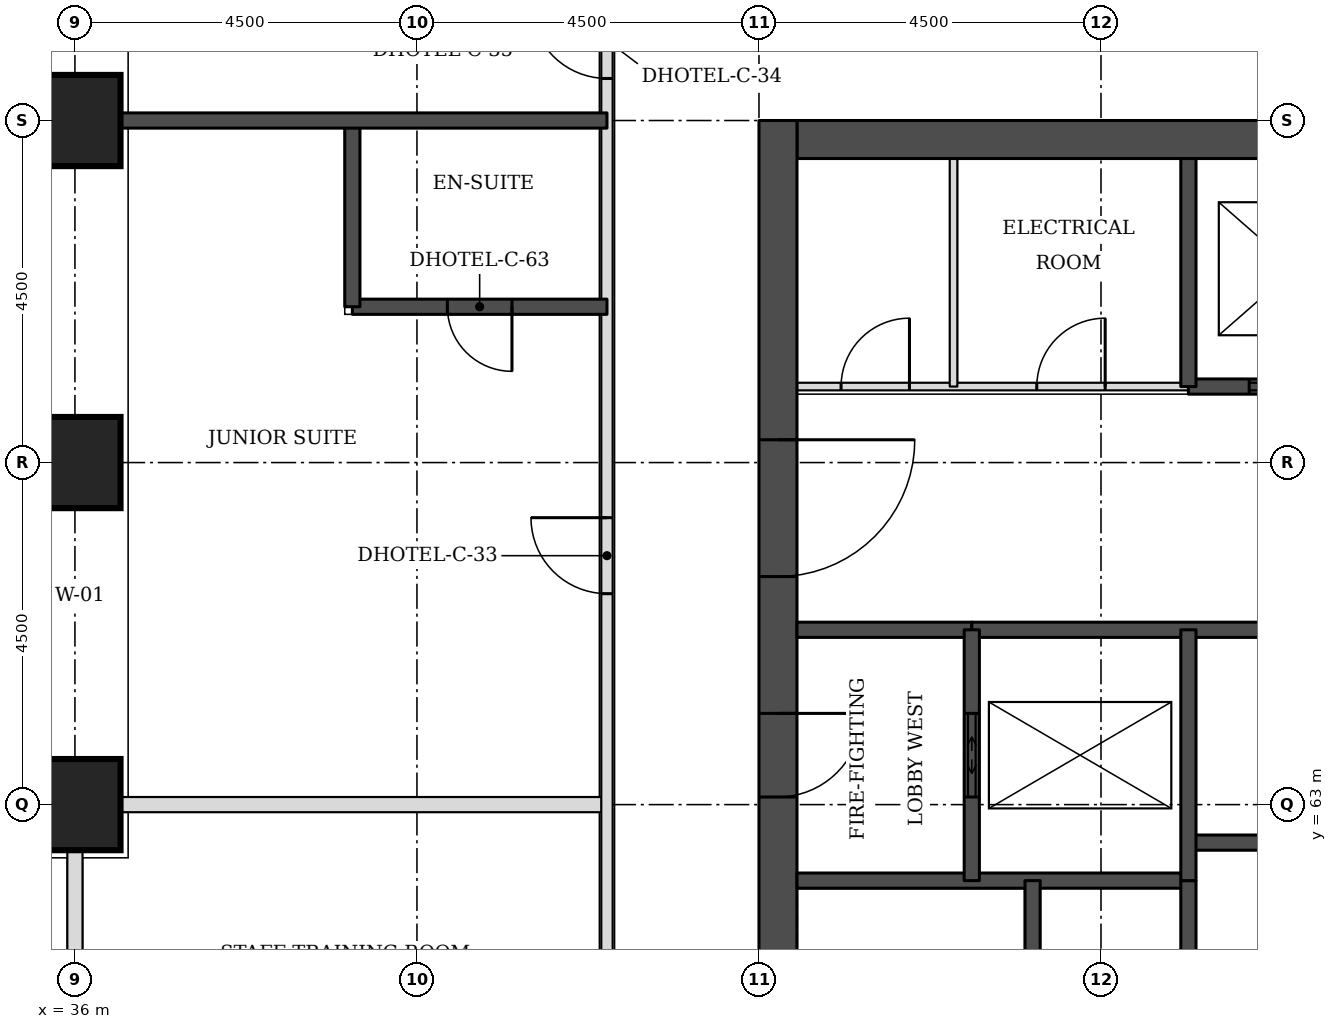
"""IFC4 building model, lengths in metres.
Left out: names, types, materials, properties, quantities, classifications, styles, units other than length and angle.
Written with IfcOpenShell. Run it as: python <this file> out.ifc"""

import sys

from ifc_helpers import new_model, si_unit, direction, frame, frame_2d, origin, origin_2d, place, context, subcontext, project, spatial, rectangle, extrude, element, fill, save


model = new_model("IFC4")
c1 = context("Model", 3, precision=1e-05, world=origin(), true_north=direction((0.0, 1.0)))
c2 = subcontext(c1, "Body", "Model", "MODEL_VIEW")
j1 = project(units=[si_unit("LENGTHUNIT", "METRE"), si_unit("PLANEANGLEUNIT", "RADIAN")], contexts=[c1])
p1 = place(None, origin())
s1 = spatial("IfcSite", under=j1, at=p1, CompositionType="ELEMENT")
p2 = place(p1, origin())
s2 = spatial("IfcBuilding", under=s1, at=p2, CompositionType="ELEMENT")
p3 = place(p2, frame((0.0, 0.0, 33.0)))
s3 = spatial("IfcBuildingStorey", under=s2, at=p3, CompositionType="ELEMENT", Elevation=33.0)
for number, where, z_axis, x_axis in (
    (1, (36.0, 63.0, 0.0), (0.0, 0.0, 1.0), (1.0, 0.0, 0.0)),
    (2, (36.0, 67.5, 0.0), (0.0, 0.0, 1.0), (1.0, 0.0, 0.0)),
    (3, (36.0, 72.0, 0.0), (0.0, 0.0, 1.0), (1.0, 0.0, 0.0)),
):
    element("IfcColumn", number, at=place(p3, frame(where, z_axis=z_axis, x_axis=x_axis)), inside=s3, PredefinedType="COLUMN", context=c2, shape_type="SweptSolid", body=[
        extrude(rectangle(XDim=1.2, YDim=1.2, at=origin_2d()), origin(), (0.0, 0.0, 1.0), 3.3),
    ])
p4 = place(p3, frame((45.5, 71.75, 0.0), z_axis=(0.0, 0.0, 1.0), x_axis=(1.0, 0.0, 0.0)))
e4 = element("IfcWall", 4, at=p4, inside=s3, PredefinedType="SHEAR", context=c2, shape_type="SweptSolid", body=[
    extrude(rectangle(XDim=21.5, YDim=0.5, at=frame_2d((10.75, 0.0))), origin(), (0.0, 0.0, 1.0), 3.3),
])
p5 = place(p3, frame((45.25, 49.5, 0.0), z_axis=(0.0, 0.0, 1.0), x_axis=(0.0, 1.0, 0.0)))
e5 = element("IfcWall", 5, at=p5, inside=s3, PredefinedType="SHEAR", context=c2, shape_type="SweptSolid", body=[
    extrude(rectangle(XDim=22.5, YDim=0.5, at=frame_2d((11.25, 0.0))), origin(), (0.0, 0.0, 1.0), 3.3),
])
p6 = place(p5, frame((4.2, 0.0, 0.0)))
e6 = element("IfcOpeningElement", 6, at=p6, cuts=e5, PredefinedType="OPENING", context=c2, shape_type="SweptSolid", body=[
    extrude(rectangle(XDim=1.8, YDim=2.1, at=frame_2d((0.9, 1.05))), frame((0.0, 0.26, 0.0), z_axis=(0.0, -1.0, 0.0), x_axis=(1.0, 0.0, 0.0)), (0.0, 0.0, 1.0), 0.52),
])
p7 = place(p5, frame((6.9, 0.0, 0.0)))
e7 = element("IfcOpeningElement", 7, at=p7, cuts=e5, PredefinedType="OPENING", context=c2, shape_type="SweptSolid", body=[
    extrude(rectangle(XDim=1.1, YDim=2.1, at=frame_2d((0.55, 1.05))), frame((0.0, 0.26, 0.0), z_axis=(0.0, -1.0, 0.0), x_axis=(1.0, 0.0, 0.0)), (0.0, 0.0, 1.0), 0.52),
])
p8 = place(p5, frame((13.6, 0.0, 0.0)))
e8 = element("IfcOpeningElement", 8, at=p8, cuts=e5, PredefinedType="OPENING", context=c2, shape_type="SweptSolid", body=[
    extrude(rectangle(XDim=1.1, YDim=2.1, at=frame_2d((0.55, 1.05))), frame((0.0, 0.26, 0.0), z_axis=(0.0, -1.0, 0.0), x_axis=(1.0, 0.0, 0.0)), (0.0, 0.0, 1.0), 0.52),
])
p9 = place(p5, frame((16.5, 0.0, 0.0)))
e9 = element("IfcOpeningElement", 9, at=p9, cuts=e5, PredefinedType="OPENING", context=c2, shape_type="SweptSolid", body=[
    extrude(rectangle(XDim=1.8, YDim=2.1, at=frame_2d((0.9, 1.05))), frame((0.0, 0.26, 0.0), z_axis=(0.0, -1.0, 0.0), x_axis=(1.0, 0.0, 0.0)), (0.0, 0.0, 1.0), 0.52),
])
p10 = place(p3, frame((36.0, 56.0, 0.0), z_axis=(0.0, 0.0, 1.0), x_axis=(0.0, 1.0, 0.0)))
e10 = element("IfcWall", 10, at=p10, inside=s3, PredefinedType="PARTITIONING", context=c2, shape_type="SweptSolid", body=[
    extrude(rectangle(XDim=6.4, YDim=0.2, at=frame_2d((3.2, 0.0))), origin(), (0.0, 0.0, 1.0), 2.33),
])
p11 = place(p3, frame((36.6, 63.0, 0.0), z_axis=(0.0, 0.0, 1.0), x_axis=(1.0, 0.0, 0.0)))
e11 = element("IfcWall", 11, at=p11, inside=s3, PredefinedType="PARTITIONING", context=c2, shape_type="SweptSolid", body=[
    extrude(rectangle(XDim=6.4, YDim=0.2, at=frame_2d((3.2, 0.0))), origin(), (0.0, 0.0, 1.0), 3.08),
])
p12 = place(p3, frame((43.0, 56.0, 0.0), z_axis=(0.0, 0.0, 1.0), x_axis=(0.0, 1.0, 0.0)))
e12 = element("IfcWall", 12, at=p12, inside=s3, PredefinedType="PARTITIONING", context=c2, shape_type="SweptSolid", body=[
    extrude(rectangle(XDim=18.0, YDim=0.15, at=frame_2d((9.0, 0.0))), origin(), (0.0, 0.0, 1.0), 3.08),
])
p13 = place(p12, frame((9.775, 0.0, 0.0)))
e13 = element("IfcOpeningElement", 13, at=p13, cuts=e12, PredefinedType="OPENING", context=c2, shape_type="SweptSolid", body=[
    extrude(rectangle(XDim=1.0, YDim=2.1, at=frame_2d((0.5, 1.05))), frame((0.0, 0.085, 0.0), z_axis=(0.0, -1.0, 0.0), x_axis=(1.0, 0.0, 0.0)), (0.0, 0.0, 1.0), 0.17),
])
p14 = place(p12, frame((16.553, 0.0, 0.0)))
e14 = element("IfcOpeningElement", 14, at=p14, cuts=e12, PredefinedType="OPENING", context=c2, shape_type="SweptSolid", body=[
    extrude(rectangle(XDim=1.0, YDim=2.1, at=frame_2d((0.5, 1.05))), frame((0.0, 0.085, 0.0), z_axis=(0.0, -1.0, 0.0), x_axis=(1.0, 0.0, 0.0)), (0.0, 0.0, 1.0), 0.17),
])
p15 = place(p12, frame((3.05, 0.0, 0.0)))
e15 = element("IfcOpeningElement", 15, at=p15, cuts=e12, PredefinedType="OPENING", context=c2, shape_type="SweptSolid", body=[
    extrude(rectangle(XDim=0.9, YDim=2.1, at=frame_2d((0.45, 1.05))), frame((0.0, 0.085, 0.0), z_axis=(0.0, -1.0, 0.0), x_axis=(1.0, 0.0, 0.0)), (0.0, 0.0, 1.0), 0.17),
])
p16 = place(p3, frame((39.65, 69.55, 0.0), z_axis=(0.0, 0.0, 1.0), x_axis=(1.0, 0.0, 0.0)))
e16 = element("IfcWall", 16, at=p16, inside=s3, PredefinedType="SOLIDWALL", context=c2, shape_type="SweptSolid", body=[
    extrude(rectangle(XDim=3.35, YDim=0.2, at=frame_2d((1.675, 0.0))), origin(), (0.0, 0.0, 1.0), 3.08),
])
p17 = place(p16, frame((1.25, 0.0, 0.0)))
e17 = element("IfcOpeningElement", 17, at=p17, cuts=e16, PredefinedType="OPENING", context=c2, shape_type="SweptSolid", body=[
    extrude(rectangle(XDim=0.85, YDim=2.1, at=frame_2d((0.425, 1.05))), frame((0.0, 0.11, 0.0), z_axis=(0.0, -1.0, 0.0), x_axis=(1.0, 0.0, 0.0)), (0.0, 0.0, 1.0), 0.22),
])
p18 = place(p3, frame((39.65, 69.55, 0.0), z_axis=(0.0, 0.0, 1.0), x_axis=(0.0, 1.0, 0.0)))
e18 = element("IfcWall", 18, at=p18, inside=s3, PredefinedType="SOLIDWALL", context=c2, shape_type="SweptSolid", body=[
    extrude(rectangle(XDim=2.45, YDim=0.2, at=frame_2d((1.225, 0.0))), origin(), (0.0, 0.0, 1.0), 3.08),
])
p19 = place(p3, frame((36.6, 72.0, 0.0), z_axis=(0.0, 0.0, 1.0), x_axis=(1.0, 0.0, 0.0)))
e19 = element("IfcWall", 19, at=p19, inside=s3, PredefinedType="SOLIDWALL", context=c2, shape_type="SweptSolid", body=[
    extrude(rectangle(XDim=6.4, YDim=0.2, at=frame_2d((3.2, 0.0))), origin(), (0.0, 0.0, 1.0), 3.08),
])
p20 = place(p3, frame((45.5, 62.0, 0.0), z_axis=(0.0, 0.0, 1.0), x_axis=(1.0, 0.0, 0.0)))
e20 = element("IfcWall", 20, at=p20, inside=s3, PredefinedType="SOLIDWALL", context=c2, shape_type="SweptSolid", body=[
    extrude(rectangle(XDim=5.15, YDim=0.2, at=frame_2d((2.575, 0.0))), origin(), (0.0, 0.0, 1.0), 3.08),
])
p21 = place(p3, frame((50.65, 62.5, 0.0), z_axis=(0.0, 0.0, 1.0), x_axis=(1.0, 0.0, 0.0)))
e21 = element("IfcWall", 21, at=p21, inside=s3, PredefinedType="SOLIDWALL", context=c2, shape_type="SweptSolid", body=[
    extrude(rectangle(XDim=11.2, YDim=0.2, at=frame_2d((5.6, 0.0))), origin(), (0.0, 0.0, 1.0), 3.3),
])
p22 = place(p3, frame((45.5, 65.3, 0.0), z_axis=(0.0, 0.0, 1.0), x_axis=(1.0, 0.0, 0.0)))
e22 = element("IfcWall", 22, at=p22, inside=s3, PredefinedType="SOLIDWALL", context=c2, shape_type="SweptSolid", body=[
    extrude(rectangle(XDim=2.3, YDim=0.2, at=frame_2d((1.15, 0.0))), origin(), (0.0, 0.0, 1.0), 3.08),
])
p23 = place(p3, frame((47.8, 65.3, 0.0), z_axis=(0.0, 0.0, 1.0), x_axis=(1.0, 0.0, 0.0)))
e23 = element("IfcWall", 23, at=p23, inside=s3, PredefinedType="SOLIDWALL", context=c2, shape_type="SweptSolid", body=[
    extrude(rectangle(XDim=16.9, YDim=0.2, at=frame_2d((8.45, 0.0))), origin(), (0.0, 0.0, 1.0), 3.08),
])
p24 = place(p3, frame((45.5, 68.5, 0.0), z_axis=(0.0, 0.0, 1.0), x_axis=(1.0, 0.0, 0.0)))
e24 = element("IfcWall", 24, at=p24, inside=s3, PredefinedType="PARTITIONING", context=c2, shape_type="SweptSolid", body=[
    extrude(rectangle(XDim=5.15, YDim=0.1, at=frame_2d((2.575, 0.0))), origin(), (0.0, 0.0, 1.0), 3.08),
])
p25 = place(p24, frame((0.58, 0.0, 0.0)))
e25 = element("IfcOpeningElement", 25, at=p25, cuts=e24, PredefinedType="OPENING", context=c2, shape_type="SweptSolid", body=[
    extrude(rectangle(XDim=0.9, YDim=2.1, at=frame_2d((0.45, 1.05))), frame((0.0, 0.06, 0.0), z_axis=(0.0, -1.0, 0.0), x_axis=(1.0, 0.0, 0.0)), (0.0, 0.0, 1.0), 0.12),
])
p26 = place(p24, frame((3.155, 0.0, 0.0)))
e26 = element("IfcOpeningElement", 26, at=p26, cuts=e24, PredefinedType="OPENING", context=c2, shape_type="SweptSolid", body=[
    extrude(rectangle(XDim=0.9, YDim=2.1, at=frame_2d((0.45, 1.05))), frame((0.0, 0.06, 0.0), z_axis=(0.0, -1.0, 0.0), x_axis=(1.0, 0.0, 0.0)), (0.0, 0.0, 1.0), 0.12),
])
p27 = place(p3, frame((50.65, 68.5, 0.0), z_axis=(0.0, 0.0, 1.0), x_axis=(1.0, 0.0, 0.0)))
e27 = element("IfcWall", 27, at=p27, inside=s3, PredefinedType="SOLIDWALL", context=c2, shape_type="SweptSolid", body=[
    extrude(rectangle(XDim=11.2, YDim=0.2, at=frame_2d((5.6, 0.0))), origin(), (0.0, 0.0, 1.0), 3.08),
])
p28 = place(p27, frame((0.8, 0.0, 0.0)))
e28 = element("IfcOpeningElement", 28, at=p28, cuts=e27, PredefinedType="OPENING", context=c2, shape_type="SweptSolid", body=[
    extrude(rectangle(XDim=1.2, YDim=2.1, at=frame_2d((0.6, 1.05))), frame((0.0, 0.11, 0.0), z_axis=(0.0, -1.0, 0.0), x_axis=(1.0, 0.0, 0.0)), (0.0, 0.0, 1.0), 0.22),
])
p29 = place(p27, frame((3.6, 0.0, 0.0)))
e29 = element("IfcOpeningElement", 29, at=p29, cuts=e27, PredefinedType="OPENING", context=c2, shape_type="SweptSolid", body=[
    extrude(rectangle(XDim=1.2, YDim=2.1, at=frame_2d((0.6, 1.05))), frame((0.0, 0.11, 0.0), z_axis=(0.0, -1.0, 0.0), x_axis=(1.0, 0.0, 0.0)), (0.0, 0.0, 1.0), 0.22),
])
p30 = place(p27, frame((6.4, 0.0, 0.0)))
e30 = element("IfcOpeningElement", 30, at=p30, cuts=e27, PredefinedType="OPENING", context=c2, shape_type="SweptSolid", body=[
    extrude(rectangle(XDim=1.2, YDim=2.1, at=frame_2d((0.6, 1.05))), frame((0.0, 0.11, 0.0), z_axis=(0.0, -1.0, 0.0), x_axis=(1.0, 0.0, 0.0)), (0.0, 0.0, 1.0), 0.22),
])
p31 = place(p27, frame((9.2, 0.0, 0.0)))
e31 = element("IfcOpeningElement", 31, at=p31, cuts=e27, PredefinedType="OPENING", context=c2, shape_type="SweptSolid", body=[
    extrude(rectangle(XDim=1.2, YDim=2.1, at=frame_2d((0.6, 1.05))), frame((0.0, 0.11, 0.0), z_axis=(0.0, -1.0, 0.0), x_axis=(1.0, 0.0, 0.0)), (0.0, 0.0, 1.0), 0.22),
])
p32 = place(p3, frame((47.56, 68.5, 0.0), z_axis=(0.0, 0.0, 1.0), x_axis=(0.0, 1.0, 0.0)))
e32 = element("IfcWall", 32, at=p32, inside=s3, PredefinedType="PARTITIONING", context=c2, shape_type="SweptSolid", body=[
    extrude(rectangle(XDim=3.0, YDim=0.1, at=frame_2d((1.5, 0.0))), origin(), (0.0, 0.0, 1.0), 3.08),
])
p33 = place(p3, frame((47.8, 62.0, 0.0), z_axis=(0.0, 0.0, 1.0), x_axis=(0.0, 1.0, 0.0)))
e33 = element("IfcWall", 33, at=p33, inside=s3, PredefinedType="SOLIDWALL", context=c2, shape_type="SweptSolid", body=[
    extrude(rectangle(XDim=3.3, YDim=0.2, at=frame_2d((1.65, 0.0))), origin(), (0.0, 0.0, 1.0), 3.08),
])
p34 = place(p33, frame((1.1, 0.0, 0.0)))
e34 = element("IfcOpeningElement", 34, at=p34, cuts=e33, PredefinedType="OPENING", context=c2, shape_type="SweptSolid", body=[
    extrude(rectangle(XDim=1.1, YDim=2.1, at=frame_2d((0.55, 1.05))), frame((0.0, 0.11, 0.0), z_axis=(0.0, -1.0, 0.0), x_axis=(1.0, 0.0, 0.0)), (0.0, 0.0, 1.0), 0.22),
])
p35 = place(p3, frame((48.6, 56.2, 0.0), z_axis=(0.0, 0.0, 1.0), x_axis=(0.0, 1.0, 0.0)))
e35 = element("IfcWall", 35, at=p35, inside=s3, PredefinedType="SOLIDWALL", context=c2, shape_type="SweptSolid", body=[
    extrude(rectangle(XDim=5.8, YDim=0.2, at=frame_2d((2.9, 0.0))), origin(), (0.0, 0.0, 1.0), 3.08),
])
p36 = place(p3, frame((50.65, 59.0, 0.0), z_axis=(0.0, 0.0, 1.0), x_axis=(0.0, 1.0, 0.0)))
e36 = element("IfcWall", 36, at=p36, inside=s3, PredefinedType="SOLIDWALL", context=c2, shape_type="SweptSolid", body=[
    extrude(rectangle(XDim=3.0, YDim=0.2, at=frame_2d((1.5, 0.0))), origin(), (0.0, 0.0, 1.0), 3.3),
])
p37 = place(p3, frame((50.65, 62.0, 0.0), z_axis=(0.0, 0.0, 1.0), x_axis=(0.0, 1.0, 0.0)))
e37 = element("IfcWall", 37, at=p37, inside=s3, PredefinedType="SOLIDWALL", context=c2, shape_type="SweptSolid", body=[
    extrude(rectangle(XDim=3.3, YDim=0.2, at=frame_2d((1.65, 0.0))), origin(), (0.0, 0.0, 1.0), 3.08),
])
p38 = place(p3, frame((50.65, 68.5, 0.0), z_axis=(0.0, 0.0, 1.0), x_axis=(0.0, 1.0, 0.0)))
e38 = element("IfcWall", 38, at=p38, inside=s3, PredefinedType="SOLIDWALL", context=c2, shape_type="SweptSolid", body=[
    extrude(rectangle(XDim=3.0, YDim=0.2, at=frame_2d((1.5, 0.0))), origin(), (0.0, 0.0, 1.0), 3.08),
])
p39 = place(p13, origin())
e39 = element("IfcDoor", 39, at=p39, inside=s3, OperationType="SINGLE_SWING_RIGHT", PredefinedType="DOOR", context=c2, shape_type="SweptSolid", body=[
    extrude(rectangle(XDim=1.0, YDim=2.1, at=frame_2d((0.5, 1.05))), frame((0.0, 0.025, 0.0), z_axis=(0.0, -1.0, 0.0), x_axis=(1.0, 0.0, 0.0)), (0.0, 0.0, 1.0), 0.05),
])
fill(e13, e39)
p40 = place(p17, frame((0.85, 0.0, 0.0), z_axis=(0.0, 0.0, 1.0), x_axis=(-1.0, 0.0, 0.0)))
e40 = element("IfcDoor", 40, at=p40, inside=s3, OperationType="SINGLE_SWING_LEFT", PredefinedType="DOOR", context=c2, shape_type="SweptSolid", body=[
    extrude(rectangle(XDim=0.85, YDim=2.1, at=frame_2d((0.425, 1.05))), frame((0.0, 0.025, 0.0), z_axis=(0.0, -1.0, 0.0), x_axis=(1.0, 0.0, 0.0)), (0.0, 0.0, 1.0), 0.05),
])
fill(e17, e40)
p41 = place(p14, origin())
e41 = element("IfcDoor", 41, at=p41, inside=s3, OperationType="SINGLE_SWING_RIGHT", PredefinedType="DOOR", context=c2, shape_type="SweptSolid", body=[
    extrude(rectangle(XDim=1.0, YDim=2.1, at=frame_2d((0.5, 1.05))), frame((0.0, 0.025, 0.0), z_axis=(0.0, -1.0, 0.0), x_axis=(1.0, 0.0, 0.0)), (0.0, 0.0, 1.0), 0.05),
])
fill(e14, e41)
p42 = place(p28, origin())
e42 = element("IfcDoor", 42, at=p42, inside=s3, OperationType="DOUBLE_DOOR_SLIDING", PredefinedType="DOOR", context=c2, shape_type="SweptSolid", body=[
    extrude(rectangle(XDim=1.2, YDim=2.1, at=frame_2d((0.6, 1.05))), frame((0.0, 0.025, 0.0), z_axis=(0.0, -1.0, 0.0), x_axis=(1.0, 0.0, 0.0)), (0.0, 0.0, 1.0), 0.05),
])
fill(e28, e42)
p43 = place(p34, origin())
e43 = element("IfcDoor", 43, at=p43, inside=s3, OperationType="DOUBLE_DOOR_SLIDING", PredefinedType="DOOR", context=c2, shape_type="SweptSolid", body=[
    extrude(rectangle(XDim=1.1, YDim=2.1, at=frame_2d((0.55, 1.05))), frame((0.0, 0.025, 0.0), z_axis=(0.0, -1.0, 0.0), x_axis=(1.0, 0.0, 0.0)), (0.0, 0.0, 1.0), 0.05),
])
fill(e34, e43)
p44 = place(p8, frame((1.1, 0.0, 0.0), z_axis=(0.0, 0.0, 1.0), x_axis=(-1.0, 0.0, 0.0)))
e44 = element("IfcDoor", 44, at=p44, inside=s3, OperationType="SINGLE_SWING_LEFT", PredefinedType="DOOR", context=c2, shape_type="SweptSolid", body=[
    extrude(rectangle(XDim=1.1, YDim=2.1, at=frame_2d((0.55, 1.05))), frame((0.0, 0.025, 0.0), z_axis=(0.0, -1.0, 0.0), x_axis=(1.0, 0.0, 0.0)), (0.0, 0.0, 1.0), 0.05),
])
fill(e8, e44)
p45 = place(p9, frame((1.8, 0.0, 0.0), z_axis=(0.0, 0.0, 1.0), x_axis=(-1.0, 0.0, 0.0)))
e45 = element("IfcDoor", 45, at=p45, inside=s3, OperationType="SINGLE_SWING_LEFT", PredefinedType="DOOR", context=c2, shape_type="SweptSolid", body=[
    extrude(rectangle(XDim=1.8, YDim=2.1, at=frame_2d((0.9, 1.05))), frame((0.0, 0.025, 0.0), z_axis=(0.0, -1.0, 0.0), x_axis=(1.0, 0.0, 0.0)), (0.0, 0.0, 1.0), 0.05),
])
fill(e9, e45)
p46 = place(p25, origin())
e46 = element("IfcDoor", 46, at=p46, inside=s3, OperationType="SINGLE_SWING_RIGHT", PredefinedType="DOOR", context=c2, shape_type="SweptSolid", body=[
    extrude(rectangle(XDim=0.9, YDim=2.1, at=frame_2d((0.45, 1.05))), frame((0.0, 0.025, 0.0), z_axis=(0.0, -1.0, 0.0), x_axis=(1.0, 0.0, 0.0)), (0.0, 0.0, 1.0), 0.05),
])
fill(e25, e46)
p47 = place(p26, origin())
e47 = element("IfcDoor", 47, at=p47, inside=s3, OperationType="SINGLE_SWING_RIGHT", PredefinedType="DOOR", context=c2, shape_type="SweptSolid", body=[
    extrude(rectangle(XDim=0.9, YDim=2.1, at=frame_2d((0.45, 1.05))), frame((0.0, 0.025, 0.0), z_axis=(0.0, -1.0, 0.0), x_axis=(1.0, 0.0, 0.0)), (0.0, 0.0, 1.0), 0.05),
])
fill(e26, e47)
save(model, sys.argv[1])
